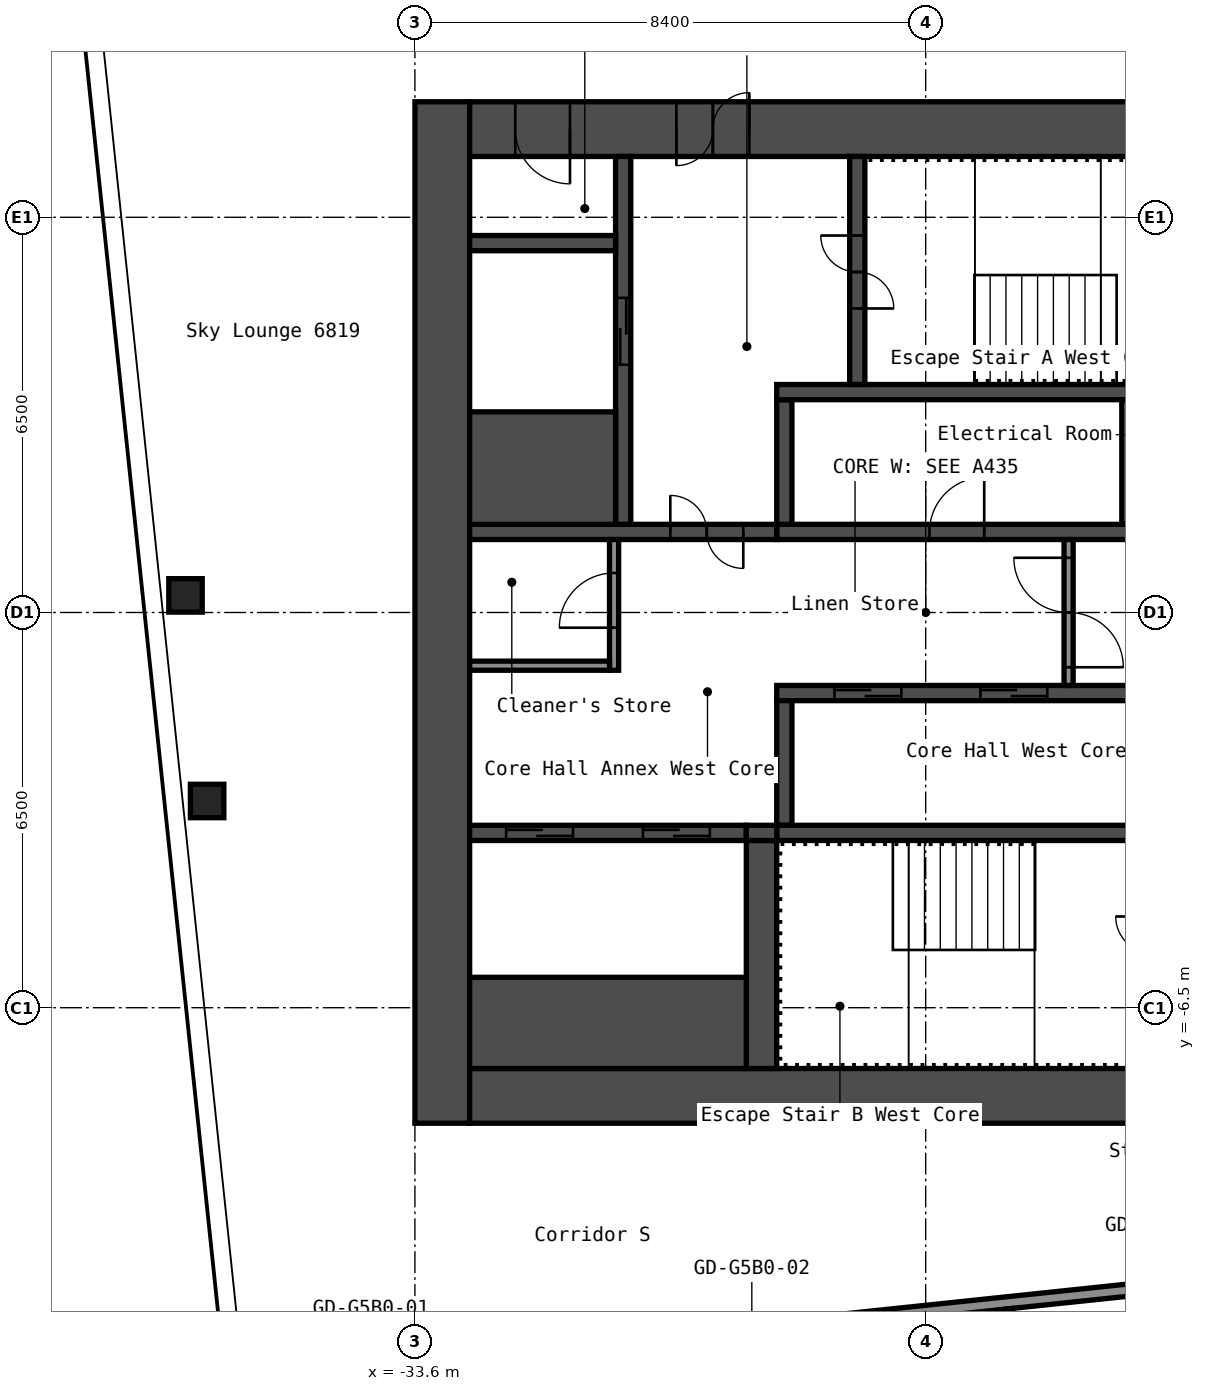
"""IFC4 building model, lengths in metres.
Left out: names, types, materials, properties, quantities, classifications, styles, units other than length and angle.
Written with IfcOpenShell. Run it as: python <this file> out.ifc"""

import sys

from ifc_helpers import new_model, si_unit, direction, frame, frame_2d, origin, origin_2d, place, context, subcontext, project, spatial, rectangle, hollow_rectangle, extrude, element, fill, save


model = new_model("IFC4")
c1 = context("Model", 3, precision=1e-05, world=origin(), true_north=direction((0.0, 1.0)))
c2 = subcontext(c1, "Body", "Model", "MODEL_VIEW")
j1 = project(units=[si_unit("LENGTHUNIT", "METRE"), si_unit("PLANEANGLEUNIT", "RADIAN")], contexts=[c1])
p1 = place(None, origin())
s1 = spatial("IfcSite", under=j1, at=p1, CompositionType="ELEMENT")
p2 = place(p1, origin())
s2 = spatial("IfcBuilding", under=s1, at=p2, CompositionType="ELEMENT")
p3 = place(p2, frame((0.0, 0.0, 242.2)))
s3 = spatial("IfcBuildingStorey", under=s2, at=p3, CompositionType="ELEMENT", Elevation=242.2)
for number, where, z_axis, x_axis in (
    (1, (-37.017, -3.1, 0.0), (0.0, 0.0, 1.0), (1.0, 0.0, 0.0)),
    (2, (-37.373, 0.281, 0.0), (0.0, 0.0, 1.0), (1.0, 0.0, 0.0)),
):
    element("IfcColumn", number, at=place(p3, frame(where, z_axis=z_axis, x_axis=x_axis)), inside=s3, PredefinedType="COLUMN", context=c2, shape_type="SweptSolid", body=[
        extrude(hollow_rectangle(XDim=0.55, YDim=0.55, WallThickness=0.022, InnerFilletRadius=0.033, OuterFilletRadius=0.055, at=origin_2d()), origin(), (0.0, 0.0, 1.0), 2.75),
    ])
p4 = place(p3, frame((-33.15, -8.4, 0.0), z_axis=(0.0, 0.0, 1.0), x_axis=(0.0, 1.0, 0.0)))
e3 = element("IfcWall", 3, at=p4, inside=s3, PredefinedType="SHEAR", context=c2, shape_type="SweptSolid", body=[
    extrude(rectangle(XDim=16.8, YDim=0.9, at=frame_2d((8.4, 0.0))), origin(), (0.0, 0.0, 1.0), 2.75),
])
p5 = place(p3, frame((-32.7, 7.95, 0.0), z_axis=(0.0, 0.0, 1.0), x_axis=(1.0, 0.0, 0.0)))
e4 = element("IfcWall", 4, at=p5, inside=s3, PredefinedType="SHEAR", context=c2, shape_type="SweptSolid", body=[
    extrude(rectangle(XDim=15.0, YDim=0.9, at=frame_2d((7.5, 0.0))), origin(), (0.0, 0.0, 1.0), 2.75),
])
p6 = place(p5, frame((3.4, 0.0, 0.0)))
e5 = element("IfcOpeningElement", 5, at=p6, cuts=e4, PredefinedType="OPENING", context=c2, shape_type="SweptSolid", body=[
    extrude(rectangle(XDim=1.2, YDim=2.1, at=frame_2d((0.6, 1.05))), frame((0.0, 0.46, 0.0), z_axis=(0.0, -1.0, 0.0), x_axis=(1.0, 0.0, 0.0)), (0.0, 0.0, 1.0), 0.92),
])
p7 = place(p5, frame((0.75, 0.0, 0.0)))
e6 = element("IfcOpeningElement", 6, at=p7, cuts=e4, PredefinedType="OPENING", context=c2, shape_type="SweptSolid", body=[
    extrude(rectangle(XDim=0.9, YDim=2.1, at=frame_2d((0.45, 1.05))), frame((0.0, 0.46, 0.0), z_axis=(0.0, -1.0, 0.0), x_axis=(1.0, 0.0, 0.0)), (0.0, 0.0, 1.0), 0.92),
])
p8 = place(p3, frame((-32.7, -7.95, 0.0), z_axis=(0.0, 0.0, 1.0), x_axis=(1.0, 0.0, 0.0)))
e7 = element("IfcWall", 7, at=p8, inside=s3, PredefinedType="SHEAR", context=c2, shape_type="SweptSolid", body=[
    extrude(rectangle(XDim=15.0, YDim=0.9, at=frame_2d((7.5, 0.0))), origin(), (0.0, 0.0, 1.0), 2.75),
])
p9 = place(p8, frame((11.45, 0.0, 0.0)))
e8 = element("IfcOpeningElement", 8, at=p9, cuts=e7, PredefinedType="OPENING", context=c2, shape_type="SweptSolid", body=[
    extrude(rectangle(XDim=1.0, YDim=2.1, at=frame_2d((0.5, 1.05))), frame((0.0, 0.46, 0.0), z_axis=(0.0, -1.0, 0.0), x_axis=(1.0, 0.0, 0.0)), (0.0, 0.0, 1.0), 0.92),
])
p10 = place(p3, frame((-27.65, 1.325, 0.0), z_axis=(0.0, 0.0, 1.0), x_axis=(1.0, 0.0, 0.0)))
e9 = element("IfcWall", 9, at=p10, inside=s3, PredefinedType="SHEAR", context=c2, shape_type="SweptSolid", body=[
    extrude(rectangle(XDim=7.5, YDim=0.25, at=frame_2d((3.75, 0.0))), origin(), (0.0, 0.0, 1.0), 2.75),
])
p11 = place(p10, frame((6.212, 0.0, 0.0)))
e10 = element("IfcOpeningElement", 10, at=p11, cuts=e9, PredefinedType="OPENING", context=c2, shape_type="SweptSolid", body=[
    extrude(rectangle(XDim=0.9, YDim=2.1, at=frame_2d((0.45, 1.05))), frame((0.0, 0.135, 0.0), z_axis=(0.0, -1.0, 0.0), x_axis=(1.0, 0.0, 0.0)), (0.0, 0.0, 1.0), 0.27),
])
p12 = place(p10, frame((2.512, 0.0, 0.0)))
e11 = element("IfcOpeningElement", 11, at=p12, cuts=e9, PredefinedType="OPENING", context=c2, shape_type="SweptSolid", body=[
    extrude(rectangle(XDim=0.9, YDim=2.1, at=frame_2d((0.45, 1.05))), frame((0.0, 0.135, 0.0), z_axis=(0.0, -1.0, 0.0), x_axis=(1.0, 0.0, 0.0)), (0.0, 0.0, 1.0), 0.27),
])
p13 = place(p3, frame((-27.525, 1.45, 0.0), z_axis=(0.0, 0.0, 1.0), x_axis=(0.0, 1.0, 0.0)))
e12 = element("IfcWall", 12, at=p13, inside=s3, PredefinedType="SHEAR", context=c2, shape_type="SweptSolid", body=[
    extrude(rectangle(XDim=2.05, YDim=0.25, at=frame_2d((1.025, 0.0))), origin(), (0.0, 0.0, 1.0), 2.75),
])
p14 = place(p3, frame((-27.65, 3.625, 0.0), z_axis=(0.0, 0.0, 1.0), x_axis=(1.0, 0.0, 0.0)))
e13 = element("IfcWall", 13, at=p14, inside=s3, PredefinedType="SHEAR", context=c2, shape_type="SweptSolid", body=[
    extrude(rectangle(XDim=7.5, YDim=0.25, at=frame_2d((3.75, 0.0))), origin(), (0.0, 0.0, 1.0), 2.75),
])
p15 = place(p3, frame((-26.325, 3.75, 0.0), z_axis=(0.0, 0.0, 1.0), x_axis=(0.0, 1.0, 0.0)))
e14 = element("IfcWall", 14, at=p15, inside=s3, PredefinedType="SHEAR", context=c2, shape_type="SweptSolid", body=[
    extrude(rectangle(XDim=3.75, YDim=0.25, at=frame_2d((1.875, 0.0))), origin(), (0.0, 0.0, 1.0), 2.75),
])
p16 = place(p15, frame((1.25, 0.0, 0.0)))
e15 = element("IfcOpeningElement", 15, at=p16, cuts=e14, PredefinedType="OPENING", context=c2, shape_type="SweptSolid", body=[
    extrude(rectangle(XDim=1.2, YDim=2.1, at=frame_2d((0.6, 1.05))), frame((0.0, 0.135, 0.0), z_axis=(0.0, -1.0, 0.0), x_axis=(1.0, 0.0, 0.0)), (0.0, 0.0, 1.0), 0.27),
])
p17 = place(p3, frame((-32.7, 1.325, 0.0), z_axis=(0.0, 0.0, 1.0), x_axis=(1.0, 0.0, 0.0)))
e16 = element("IfcWall", 16, at=p17, inside=s3, PredefinedType="SHEAR", context=c2, shape_type="SweptSolid", body=[
    extrude(rectangle(XDim=5.05, YDim=0.25, at=frame_2d((2.525, 0.0))), origin(), (0.0, 0.0, 1.0), 2.75),
])
p18 = place(p17, frame((3.3, 0.0, 0.0)))
e17 = element("IfcOpeningElement", 17, at=p18, cuts=e16, PredefinedType="OPENING", context=c2, shape_type="SweptSolid", body=[
    extrude(rectangle(XDim=1.2, YDim=2.1, at=frame_2d((0.6, 1.05))), frame((0.0, 0.135, 0.0), z_axis=(0.0, -1.0, 0.0), x_axis=(1.0, 0.0, 0.0)), (0.0, 0.0, 1.0), 0.27),
])
p19 = place(p3, frame((-30.175, 1.45, 0.0), z_axis=(0.0, 0.0, 1.0), x_axis=(0.0, 1.0, 0.0)))
e18 = element("IfcWall", 18, at=p19, inside=s3, PredefinedType="SHEAR", context=c2, shape_type="SweptSolid", body=[
    extrude(rectangle(XDim=6.05, YDim=0.25, at=frame_2d((3.025, 0.0))), origin(), (0.0, 0.0, 1.0), 2.75),
])
p20 = place(p19, frame((2.625, 0.0, 0.0)))
e19 = element("IfcOpeningElement", 19, at=p20, cuts=e18, PredefinedType="OPENING", context=c2, shape_type="SweptSolid", body=[
    extrude(rectangle(XDim=1.1, YDim=2.1, at=frame_2d((0.55, 1.05))), frame((0.0, 0.135, 0.0), z_axis=(0.0, -1.0, 0.0), x_axis=(1.0, 0.0, 0.0)), (0.0, 0.0, 1.0), 0.27),
])
p21 = place(p3, frame((-32.7, 2.375, 0.0), z_axis=(0.0, 0.0, 1.0), x_axis=(1.0, 0.0, 0.0)))
e20 = element("IfcWall", 20, at=p21, inside=s3, PredefinedType="SHEAR", context=c2, shape_type="SweptSolid", body=[
    extrude(rectangle(XDim=2.4, YDim=1.85, at=frame_2d((1.2, 0.0))), origin(), (0.0, 0.0, 1.0), 2.75),
])
p22 = place(p3, frame((-32.7, 6.075, 0.0), z_axis=(0.0, 0.0, 1.0), x_axis=(1.0, 0.0, 0.0)))
e21 = element("IfcWall", 21, at=p22, inside=s3, PredefinedType="SHEAR", context=c2, shape_type="SweptSolid", body=[
    extrude(rectangle(XDim=2.4, YDim=0.25, at=frame_2d((1.2, 0.0))), origin(), (0.0, 0.0, 1.0), 2.75),
])
p23 = place(p3, frame((-27.65, -1.325, 0.0), z_axis=(0.0, 0.0, 1.0), x_axis=(1.0, 0.0, 0.0)))
e22 = element("IfcWall", 22, at=p23, inside=s3, PredefinedType="SHEAR", context=c2, shape_type="SweptSolid", body=[
    extrude(rectangle(XDim=7.5, YDim=0.25, at=frame_2d((3.75, 0.0))), origin(), (0.0, 0.0, 1.0), 2.75),
])
p24 = place(p23, frame((5.75, 0.0, 0.0)))
e23 = element("IfcOpeningElement", 23, at=p24, cuts=e22, PredefinedType="OPENING", context=c2, shape_type="SweptSolid", body=[
    extrude(rectangle(XDim=1.1, YDim=2.1, at=frame_2d((0.55, 1.05))), frame((0.0, 0.135, 0.0), z_axis=(0.0, -1.0, 0.0), x_axis=(1.0, 0.0, 0.0)), (0.0, 0.0, 1.0), 0.27),
])
p25 = place(p23, frame((3.35, 0.0, 0.0)))
e24 = element("IfcOpeningElement", 24, at=p25, cuts=e22, PredefinedType="OPENING", context=c2, shape_type="SweptSolid", body=[
    extrude(rectangle(XDim=1.1, YDim=2.1, at=frame_2d((0.55, 1.05))), frame((0.0, 0.135, 0.0), z_axis=(0.0, -1.0, 0.0), x_axis=(1.0, 0.0, 0.0)), (0.0, 0.0, 1.0), 0.27),
])
p26 = place(p23, frame((0.95, 0.0, 0.0)))
e25 = element("IfcOpeningElement", 25, at=p26, cuts=e22, PredefinedType="OPENING", context=c2, shape_type="SweptSolid", body=[
    extrude(rectangle(XDim=1.1, YDim=2.1, at=frame_2d((0.55, 1.05))), frame((0.0, 0.135, 0.0), z_axis=(0.0, -1.0, 0.0), x_axis=(1.0, 0.0, 0.0)), (0.0, 0.0, 1.0), 0.27),
])
p27 = place(p3, frame((-27.525, -3.5, 0.0), z_axis=(0.0, 0.0, 1.0), x_axis=(0.0, 1.0, 0.0)))
e26 = element("IfcWall", 26, at=p27, inside=s3, PredefinedType="SHEAR", context=c2, shape_type="SweptSolid", body=[
    extrude(rectangle(XDim=2.05, YDim=0.25, at=frame_2d((1.025, 0.0))), origin(), (0.0, 0.0, 1.0), 2.75),
])
p28 = place(p3, frame((-27.65, -3.625, 0.0), z_axis=(0.0, 0.0, 1.0), x_axis=(1.0, 0.0, 0.0)))
e27 = element("IfcWall", 27, at=p28, inside=s3, PredefinedType="SHEAR", context=c2, shape_type="SweptSolid", body=[
    extrude(rectangle(XDim=7.5, YDim=0.25, at=frame_2d((3.75, 0.0))), origin(), (0.0, 0.0, 1.0), 2.75),
])
p29 = place(p3, frame((-27.9, -7.5, 0.0), z_axis=(0.0, 0.0, 1.0), x_axis=(0.0, 1.0, 0.0)))
e28 = element("IfcWall", 28, at=p29, inside=s3, PredefinedType="SHEAR", context=c2, shape_type="SweptSolid", body=[
    extrude(rectangle(XDim=3.75, YDim=0.5, at=frame_2d((1.875, 0.0))), origin(), (0.0, 0.0, 1.0), 2.75),
])
p30 = place(p3, frame((-32.7, -3.625, 0.0), z_axis=(0.0, 0.0, 1.0), x_axis=(1.0, 0.0, 0.0)))
e29 = element("IfcWall", 29, at=p30, inside=s3, PredefinedType="SHEAR", context=c2, shape_type="SweptSolid", body=[
    extrude(rectangle(XDim=4.55, YDim=0.25, at=frame_2d((2.275, 0.0))), origin(), (0.0, 0.0, 1.0), 2.75),
])
p31 = place(p30, frame((2.85, 0.0, 0.0)))
e30 = element("IfcOpeningElement", 30, at=p31, cuts=e29, PredefinedType="OPENING", context=c2, shape_type="SweptSolid", body=[
    extrude(rectangle(XDim=1.1, YDim=2.1, at=frame_2d((0.55, 1.05))), frame((0.0, 0.135, 0.0), z_axis=(0.0, -1.0, 0.0), x_axis=(1.0, 0.0, 0.0)), (0.0, 0.0, 1.0), 0.27),
])
p32 = place(p30, frame((0.6, 0.0, 0.0)))
e31 = element("IfcOpeningElement", 31, at=p32, cuts=e29, PredefinedType="OPENING", context=c2, shape_type="SweptSolid", body=[
    extrude(rectangle(XDim=1.1, YDim=2.1, at=frame_2d((0.55, 1.05))), frame((0.0, 0.135, 0.0), z_axis=(0.0, -1.0, 0.0), x_axis=(1.0, 0.0, 0.0)), (0.0, 0.0, 1.0), 0.27),
])
p33 = place(p3, frame((-32.7, -6.75, 0.0), z_axis=(0.0, 0.0, 1.0), x_axis=(1.0, 0.0, 0.0)))
e32 = element("IfcWall", 32, at=p33, inside=s3, PredefinedType="SHEAR", context=c2, shape_type="SweptSolid", body=[
    extrude(rectangle(XDim=4.55, YDim=1.5, at=frame_2d((2.275, 0.0))), origin(), (0.0, 0.0, 1.0), 2.75),
])
p34 = place(p3, frame((-28.15, -3.625, 0.0), z_axis=(0.0, 0.0, 1.0), x_axis=(1.0, 0.0, 0.0)))
e33 = element("IfcWall", 33, at=p34, inside=s3, PredefinedType="SHEAR", context=c2, shape_type="SweptSolid", body=[
    extrude(rectangle(XDim=0.5, YDim=0.25, at=frame_2d((0.25, 0.0))), origin(), (0.0, 0.0, 1.0), 2.75),
])
p35 = place(p3, frame((-22.85, -1.2, 0.0), z_axis=(0.0, 0.0, 1.0), x_axis=(0.0, 1.0, 0.0)))
e34 = element("IfcWall", 34, at=p35, inside=s3, PredefinedType="PARTITIONING", context=c2, shape_type="SweptSolid", body=[
    extrude(rectangle(XDim=2.4, YDim=0.15, at=frame_2d((1.2, 0.0))), origin(), (0.0, 0.0, 1.0), 2.75),
])
p36 = place(p35, frame((0.3, 0.0, 0.0)))
e35 = element("IfcOpeningElement", 35, at=p36, cuts=e34, PredefinedType="OPENING", context=c2, shape_type="SweptSolid", body=[
    extrude(rectangle(XDim=1.8, YDim=2.1, at=frame_2d((0.9, 1.05))), frame((0.0, 0.085, 0.0), z_axis=(0.0, -1.0, 0.0), x_axis=(1.0, 0.0, 0.0)), (0.0, 0.0, 1.0), 0.17),
])
p37 = place(p3, frame((-30.325, -0.95, 0.0), z_axis=(0.0, 0.0, 1.0), x_axis=(0.0, 1.0, 0.0)))
e36 = element("IfcWall", 36, at=p37, inside=s3, PredefinedType="PARTITIONING", context=c2, shape_type="SweptSolid", body=[
    extrude(rectangle(XDim=2.15, YDim=0.15, at=frame_2d((1.075, 0.0))), origin(), (0.0, 0.0, 1.0), 2.75),
])
p38 = place(p37, frame((0.7, 0.0, 0.0)))
e37 = element("IfcOpeningElement", 37, at=p38, cuts=e36, PredefinedType="OPENING", context=c2, shape_type="SweptSolid", body=[
    extrude(rectangle(XDim=0.9, YDim=2.1, at=frame_2d((0.45, 1.05))), frame((0.0, 0.085, 0.0), z_axis=(0.0, -1.0, 0.0), x_axis=(1.0, 0.0, 0.0)), (0.0, 0.0, 1.0), 0.17),
])
p39 = place(p3, frame((-32.7, -0.875, 0.0), z_axis=(0.0, 0.0, 1.0), x_axis=(1.0, 0.0, 0.0)))
e38 = element("IfcWall", 38, at=p39, inside=s3, PredefinedType="PARTITIONING", context=c2, shape_type="SweptSolid", body=[
    extrude(rectangle(XDim=2.3, YDim=0.15, at=frame_2d((1.15, 0.0))), origin(), (0.0, 0.0, 1.0), 2.75),
])
p40 = place(p3, frame((-21.9, 1.45, 0.0), z_axis=(0.0, 0.0, 1.0), x_axis=(0.0, 1.0, 0.0)))
e39 = element("IfcWall", 39, at=p40, inside=s3, PredefinedType="PARTITIONING", context=c2, shape_type="SweptSolid", body=[
    extrude(rectangle(XDim=2.05, YDim=0.15, at=frame_2d((1.025, 0.0))), origin(), (0.0, 0.0, 1.0), 2.75),
])
p41 = place(p3, frame((-36.712, -12.705, 0.0), z_axis=(0.0, 0.0, 1.0), x_axis=(0.994522460242, 0.104523088709, 0.0)))
e40 = element("IfcWall", 40, at=p41, inside=s3, PredefinedType="PARTITIONING", context=c2, shape_type="SweptSolid", body=[
    extrude(rectangle(XDim=21.3, YDim=0.2, at=frame_2d((10.65, 0.0))), origin(), (0.0, 0.0, 1.0), 2.75),
])
p42 = place(p41, frame((1.95, 0.0, 0.0)))
e41 = element("IfcOpeningElement", 41, at=p42, cuts=e40, PredefinedType="OPENING", context=c2, shape_type="SweptSolid", body=[
    extrude(rectangle(XDim=0.9, YDim=2.1, at=frame_2d((0.45, 1.05))), frame((0.0, 0.11, 0.0), z_axis=(0.0, -1.0, 0.0), x_axis=(1.0, 0.0, 0.0)), (0.0, 0.0, 1.0), 0.22),
])
p43 = place(p41, frame((8.2, 0.0, 0.0)))
e42 = element("IfcOpeningElement", 42, at=p43, cuts=e40, PredefinedType="OPENING", context=c2, shape_type="SweptSolid", body=[
    extrude(rectangle(XDim=1.0, YDim=2.1, at=frame_2d((0.5, 1.05))), frame((0.0, 0.11, 0.0), z_axis=(0.0, -1.0, 0.0), x_axis=(1.0, 0.0, 0.0)), (0.0, 0.0, 1.0), 0.22),
])
p44 = place(p41, frame((15.055, 0.0, 0.0)))
e43 = element("IfcOpeningElement", 43, at=p44, cuts=e40, PredefinedType="OPENING", context=c2, shape_type="SweptSolid", body=[
    extrude(rectangle(XDim=0.9, YDim=2.1, at=frame_2d((0.45, 1.05))), frame((0.0, 0.11, 0.0), z_axis=(0.0, -1.0, 0.0), x_axis=(1.0, 0.0, 0.0)), (0.0, 0.0, 1.0), 0.22),
])
p45 = place(p41, frame((19.255, 0.0, 0.0)))
e44 = element("IfcOpeningElement", 44, at=p45, cuts=e40, PredefinedType="OPENING", context=c2, shape_type="SweptSolid", body=[
    extrude(rectangle(XDim=0.9, YDim=2.1, at=frame_2d((0.45, 1.05))), frame((0.0, 0.11, 0.0), z_axis=(0.0, -1.0, 0.0), x_axis=(1.0, 0.0, 0.0)), (0.0, 0.0, 1.0), 0.22),
])
p46 = place(p3, frame((-23.254, -17.339, 0.0), z_axis=(0.0, 0.0, 1.0), x_axis=(-0.10453655107, 0.994521045273, 0.0)))
e45 = element("IfcWall", 45, at=p46, inside=s3, PredefinedType="PARTITIONING", context=c2, shape_type="SweptSolid", body=[
    extrude(rectangle(XDim=5.916, YDim=0.2, at=frame_2d((2.958, 0.0))), origin(), (0.0, 0.0, 1.0), 2.75),
])
p47 = place(p6, origin())
e46 = element("IfcDoor", 46, at=p47, inside=s3, OperationType="DOUBLE_DOOR_SINGLE_SWING", PredefinedType="DOOR", context=c2, shape_type="SweptSolid", body=[
    extrude(rectangle(XDim=1.2, YDim=2.1, at=frame_2d((0.6, 1.05))), frame((0.0, 0.025, 0.0), z_axis=(0.0, -1.0, 0.0), x_axis=(1.0, 0.0, 0.0)), (0.0, 0.0, 1.0), 0.05),
])
fill(e5, e46)
p48 = place(p7, origin())
e47 = element("IfcDoor", 47, at=p48, inside=s3, OperationType="SINGLE_SWING_RIGHT", PredefinedType="DOOR", context=c2, shape_type="SweptSolid", body=[
    extrude(rectangle(XDim=0.9, YDim=2.1, at=frame_2d((0.45, 1.05))), frame((0.0, 0.025, 0.0), z_axis=(0.0, -1.0, 0.0), x_axis=(1.0, 0.0, 0.0)), (0.0, 0.0, 1.0), 0.05),
])
fill(e6, e47)
p49 = place(p16, origin())
e48 = element("IfcDoor", 48, at=p49, inside=s3, OperationType="DOUBLE_DOOR_SINGLE_SWING", PredefinedType="DOOR", context=c2, shape_type="SweptSolid", body=[
    extrude(rectangle(XDim=1.2, YDim=2.1, at=frame_2d((0.6, 1.05))), frame((0.0, 0.025, 0.0), z_axis=(0.0, -1.0, 0.0), x_axis=(1.0, 0.0, 0.0)), (0.0, 0.0, 1.0), 0.05),
])
fill(e15, e48)
p50 = place(p18, origin())
e49 = element("IfcDoor", 49, at=p50, inside=s3, OperationType="DOUBLE_DOOR_SINGLE_SWING", PredefinedType="DOOR", context=c2, shape_type="SweptSolid", body=[
    extrude(rectangle(XDim=1.2, YDim=2.1, at=frame_2d((0.6, 1.05))), frame((0.0, 0.025, 0.0), z_axis=(0.0, -1.0, 0.0), x_axis=(1.0, 0.0, 0.0)), (0.0, 0.0, 1.0), 0.05),
])
fill(e17, e49)
p51 = place(p36, origin())
e50 = element("IfcDoor", 50, at=p51, inside=s3, OperationType="DOUBLE_DOOR_SINGLE_SWING", PredefinedType="DOOR", context=c2, shape_type="SweptSolid", body=[
    extrude(rectangle(XDim=1.8, YDim=2.1, at=frame_2d((0.9, 1.05))), frame((0.0, 0.025, 0.0), z_axis=(0.0, -1.0, 0.0), x_axis=(1.0, 0.0, 0.0)), (0.0, 0.0, 1.0), 0.05),
])
fill(e35, e50)
p52 = place(p38, origin())
e51 = element("IfcDoor", 51, at=p52, inside=s3, OperationType="SINGLE_SWING_RIGHT", PredefinedType="DOOR", context=c2, shape_type="SweptSolid", body=[
    extrude(rectangle(XDim=0.9, YDim=2.1, at=frame_2d((0.45, 1.05))), frame((0.0, 0.025, 0.0), z_axis=(0.0, -1.0, 0.0), x_axis=(1.0, 0.0, 0.0)), (0.0, 0.0, 1.0), 0.05),
])
fill(e37, e51)
p53 = place(p12, origin())
e52 = element("IfcDoor", 52, at=p53, inside=s3, OperationType="SINGLE_SWING_LEFT", PredefinedType="DOOR", context=c2, shape_type="SweptSolid", body=[
    extrude(rectangle(XDim=0.9, YDim=2.1, at=frame_2d((0.45, 1.05))), frame((0.0, 0.025, 0.0), z_axis=(0.0, -1.0, 0.0), x_axis=(1.0, 0.0, 0.0)), (0.0, 0.0, 1.0), 0.05),
])
fill(e11, e52)
p54 = place(p25, origin())
e53 = element("IfcDoor", 53, at=p54, inside=s3, OperationType="DOUBLE_DOOR_SLIDING", PredefinedType="DOOR", context=c2, shape_type="SweptSolid", body=[
    extrude(rectangle(XDim=1.1, YDim=2.1, at=frame_2d((0.55, 1.05))), frame((0.0, 0.025, 0.0), z_axis=(0.0, -1.0, 0.0), x_axis=(1.0, 0.0, 0.0)), (0.0, 0.0, 1.0), 0.05),
])
fill(e24, e53)
p55 = place(p26, origin())
e54 = element("IfcDoor", 54, at=p55, inside=s3, OperationType="DOUBLE_DOOR_SLIDING", PredefinedType="DOOR", context=c2, shape_type="SweptSolid", body=[
    extrude(rectangle(XDim=1.1, YDim=2.1, at=frame_2d((0.55, 1.05))), frame((0.0, 0.025, 0.0), z_axis=(0.0, -1.0, 0.0), x_axis=(1.0, 0.0, 0.0)), (0.0, 0.0, 1.0), 0.05),
])
fill(e25, e54)
p56 = place(p20, origin())
e55 = element("IfcDoor", 55, at=p56, inside=s3, OperationType="DOUBLE_DOOR_SLIDING", PredefinedType="DOOR", context=c2, shape_type="SweptSolid", body=[
    extrude(rectangle(XDim=1.1, YDim=2.1, at=frame_2d((0.55, 1.05))), frame((0.0, 0.025, 0.0), z_axis=(0.0, -1.0, 0.0), x_axis=(1.0, 0.0, 0.0)), (0.0, 0.0, 1.0), 0.05),
])
fill(e19, e55)
p57 = place(p31, origin())
e56 = element("IfcDoor", 56, at=p57, inside=s3, OperationType="DOUBLE_DOOR_SLIDING", PredefinedType="DOOR", context=c2, shape_type="SweptSolid", body=[
    extrude(rectangle(XDim=1.1, YDim=2.1, at=frame_2d((0.55, 1.05))), frame((0.0, 0.025, 0.0), z_axis=(0.0, -1.0, 0.0), x_axis=(1.0, 0.0, 0.0)), (0.0, 0.0, 1.0), 0.05),
])
fill(e30, e56)
p58 = place(p32, origin())
e57 = element("IfcDoor", 57, at=p58, inside=s3, OperationType="DOUBLE_DOOR_SLIDING", PredefinedType="DOOR", context=c2, shape_type="SweptSolid", body=[
    extrude(rectangle(XDim=1.1, YDim=2.1, at=frame_2d((0.55, 1.05))), frame((0.0, 0.025, 0.0), z_axis=(0.0, -1.0, 0.0), x_axis=(1.0, 0.0, 0.0)), (0.0, 0.0, 1.0), 0.05),
])
fill(e31, e57)
save(model, sys.argv[1])
